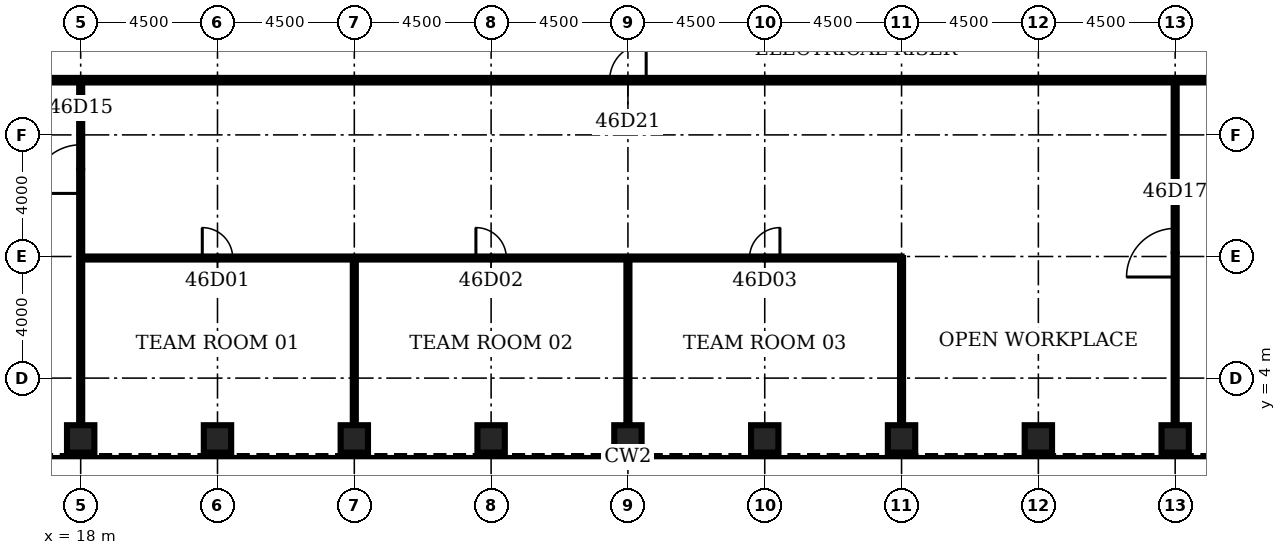
"""IFC4 building model, lengths in metres.
Left out: names, types, materials, properties, quantities, classifications, styles, units other than length and angle.
Written with IfcOpenShell. Run it as: python <this file> out.ifc"""

import sys

from ifc_helpers import new_model, si_unit, direction, frame, frame_2d, origin, origin_2d, place, context, subcontext, project, spatial, rectangle, hollow_rectangle, extrude, element, fill, save


model = new_model("IFC4")
c1 = context("Model", 3, precision=1e-05, world=origin(), true_north=direction((0.0, 1.0)))
c2 = subcontext(c1, "Body", "Model", "MODEL_VIEW")
j1 = project(units=[si_unit("LENGTHUNIT", "METRE"), si_unit("PLANEANGLEUNIT", "RADIAN")], contexts=[c1])
p1 = place(None, origin())
s1 = spatial("IfcSite", under=j1, at=p1, CompositionType="ELEMENT")
p2 = place(p1, origin())
s2 = spatial("IfcBuilding", under=s1, at=p2, CompositionType="ELEMENT")
p3 = place(p2, frame((0.0, 0.0, 206.8)))
s3 = spatial("IfcBuildingStorey", under=s2, at=p3, CompositionType="ELEMENT", Elevation=206.8)
for number, where, z_axis, x_axis in (
    (1, (18.0, 2.0, 0.0), (0.0, 0.0, 1.0), (0.0, 1.0, 0.0)),
    (2, (22.5, 2.0, 0.0), (0.0, 0.0, 1.0), (0.0, 1.0, 0.0)),
    (3, (27.0, 2.0, 0.0), (0.0, 0.0, 1.0), (0.0, 1.0, 0.0)),
    (4, (31.5, 2.0, 0.0), (0.0, 0.0, 1.0), (0.0, 1.0, 0.0)),
    (5, (36.0, 2.0, 0.0), (0.0, 0.0, 1.0), (0.0, 1.0, 0.0)),
    (6, (40.5, 2.0, 0.0), (0.0, 0.0, 1.0), (0.0, 1.0, 0.0)),
    (7, (45.0, 2.0, 0.0), (0.0, 0.0, 1.0), (0.0, 1.0, 0.0)),
    (8, (49.5, 2.0, 0.0), (0.0, 0.0, 1.0), (0.0, 1.0, 0.0)),
    (9, (54.0, 2.0, 0.0), (0.0, 0.0, 1.0), (0.0, 1.0, 0.0)),
):
    element("IfcColumn", number, at=place(p3, frame(where, z_axis=z_axis, x_axis=x_axis)), inside=s3, PredefinedType="COLUMN", context=c2, shape_type="SweptSolid", body=[
        extrude(hollow_rectangle(XDim=0.9, YDim=0.9, WallThickness=0.08, at=origin_2d()), origin(), (0.0, 0.0, 1.0), 4.2),
    ])
p4 = place(p3, frame((18.0, 7.95, 0.0), z_axis=(0.0, 0.0, 1.0), x_axis=(1.0, 0.0, 0.0)))
e10 = element("IfcWall", 10, at=p4, inside=s3, PredefinedType="PARTITIONING", context=c2, shape_type="SweptSolid", body=[
    extrude(rectangle(XDim=27.0, YDim=0.1, at=frame_2d((13.5, 0.0))), origin(), (0.0, 0.0, 1.0), 3.0),
])
p5 = place(p4, frame((4.0, 0.0, 0.0)))
e11 = element("IfcOpeningElement", 11, at=p5, cuts=e10, PredefinedType="OPENING", context=c2, shape_type="SweptSolid", body=[
    extrude(rectangle(XDim=1.0, YDim=2.1, at=frame_2d((0.5, 1.05))), frame((0.0, 0.06, 0.0), z_axis=(0.0, -1.0, 0.0), x_axis=(1.0, 0.0, 0.0)), (0.0, 0.0, 1.0), 0.12),
])
p6 = place(p4, frame((13.0, 0.0, 0.0)))
e12 = element("IfcOpeningElement", 12, at=p6, cuts=e10, PredefinedType="OPENING", context=c2, shape_type="SweptSolid", body=[
    extrude(rectangle(XDim=1.0, YDim=2.1, at=frame_2d((0.5, 1.05))), frame((0.0, 0.06, 0.0), z_axis=(0.0, -1.0, 0.0), x_axis=(1.0, 0.0, 0.0)), (0.0, 0.0, 1.0), 0.12),
])
p7 = place(p4, frame((22.0, 0.0, 0.0)))
e13 = element("IfcOpeningElement", 13, at=p7, cuts=e10, PredefinedType="OPENING", context=c2, shape_type="SweptSolid", body=[
    extrude(rectangle(XDim=1.0, YDim=2.1, at=frame_2d((0.5, 1.05))), frame((0.0, 0.06, 0.0), z_axis=(0.0, -1.0, 0.0), x_axis=(1.0, 0.0, 0.0)), (0.0, 0.0, 1.0), 0.12),
])
p8 = place(p3, frame((15.2, 13.8, 0.0), z_axis=(0.0, 0.0, 1.0), x_axis=(1.0, 0.0, 0.0)))
e14 = element("IfcWall", 14, at=p8, inside=s3, PredefinedType="PARTITIONING", context=c2, shape_type="SweptSolid", body=[
    extrude(rectangle(XDim=41.6, YDim=0.15, at=frame_2d((20.8, 0.0))), origin(), (0.0, 0.0, 1.0), 3.0),
])
p9 = place(p8, frame((20.2, 0.0, 0.0)))
e15 = element("IfcOpeningElement", 15, at=p9, cuts=e14, PredefinedType="OPENING", context=c2, shape_type="SweptSolid", body=[
    extrude(rectangle(XDim=1.2, YDim=2.1, at=frame_2d((0.6, 1.05))), frame((0.0, 0.085, 0.0), z_axis=(0.0, -1.0, 0.0), x_axis=(1.0, 0.0, 0.0)), (0.0, 0.0, 1.0), 0.17),
])
p10 = place(p3, frame((18.0, 2.45, 0.0), z_axis=(0.0, 0.0, 1.0), x_axis=(0.0, 1.0, 0.0)))
e16 = element("IfcWall", 16, at=p10, inside=s3, PredefinedType="PARTITIONING", context=c2, shape_type="SweptSolid", body=[
    extrude(rectangle(XDim=11.35, YDim=0.1, at=frame_2d((5.675, 0.0))), origin(), (0.0, 0.0, 1.0), 3.0),
])
p11 = place(p10, frame((7.625, 0.0, 0.0)))
e17 = element("IfcOpeningElement", 17, at=p11, cuts=e16, PredefinedType="OPENING", context=c2, shape_type="SweptSolid", body=[
    extrude(rectangle(XDim=1.6, YDim=2.1, at=frame_2d((0.8, 1.05))), frame((0.0, 0.06, 0.0), z_axis=(0.0, -1.0, 0.0), x_axis=(1.0, 0.0, 0.0)), (0.0, 0.0, 1.0), 0.12),
])
for number, where, z_axis, x_axis in (
    (18, (27.0, 2.45, 0.0), (0.0, 0.0, 1.0), (0.0, 1.0, 0.0)),
    (19, (36.0, 2.45, 0.0), (0.0, 0.0, 1.0), (0.0, 1.0, 0.0)),
    (20, (45.0, 2.45, 0.0), (0.0, 0.0, 1.0), (0.0, 1.0, 0.0)),
):
    element("IfcWall", number, at=place(p3, frame(where, z_axis=z_axis, x_axis=x_axis)), inside=s3, PredefinedType="PARTITIONING", context=c2, shape_type="SweptSolid", body=[
        extrude(rectangle(XDim=5.5, YDim=0.1, at=frame_2d((2.75, 0.0))), origin(), (0.0, 0.0, 1.0), 3.0),
    ])
p12 = place(p3, frame((54.0, 2.45, 0.0), z_axis=(0.0, 0.0, 1.0), x_axis=(0.0, 1.0, 0.0)))
e21 = element("IfcWall", 21, at=p12, inside=s3, PredefinedType="PARTITIONING", context=c2, shape_type="SweptSolid", body=[
    extrude(rectangle(XDim=11.35, YDim=0.1, at=frame_2d((5.675, 0.0))), origin(), (0.0, 0.0, 1.0), 3.0),
])
p13 = place(p12, frame((4.875, 0.0, 0.0)))
e22 = element("IfcOpeningElement", 22, at=p13, cuts=e21, PredefinedType="OPENING", context=c2, shape_type="SweptSolid", body=[
    extrude(rectangle(XDim=1.6, YDim=2.1, at=frame_2d((0.8, 1.05))), frame((0.0, 0.06, 0.0), z_axis=(0.0, -1.0, 0.0), x_axis=(1.0, 0.0, 0.0)), (0.0, 0.0, 1.0), 0.12),
])
p14 = place(p5, origin())
e23 = element("IfcDoor", 23, at=p14, inside=s3, OperationType="SINGLE_SWING_LEFT", PredefinedType="DOOR", context=c2, shape_type="SweptSolid", body=[
    extrude(rectangle(XDim=1.0, YDim=2.1, at=frame_2d((0.5, 1.05))), frame((0.0, 0.025, 0.0), z_axis=(0.0, -1.0, 0.0), x_axis=(1.0, 0.0, 0.0)), (0.0, 0.0, 1.0), 0.05),
])
fill(e11, e23)
p15 = place(p6, origin())
e24 = element("IfcDoor", 24, at=p15, inside=s3, OperationType="SINGLE_SWING_LEFT", PredefinedType="DOOR", context=c2, shape_type="SweptSolid", body=[
    extrude(rectangle(XDim=1.0, YDim=2.1, at=frame_2d((0.5, 1.05))), frame((0.0, 0.025, 0.0), z_axis=(0.0, -1.0, 0.0), x_axis=(1.0, 0.0, 0.0)), (0.0, 0.0, 1.0), 0.05),
])
fill(e12, e24)
p16 = place(p7, origin())
e25 = element("IfcDoor", 25, at=p16, inside=s3, OperationType="SINGLE_SWING_RIGHT", PredefinedType="DOOR", context=c2, shape_type="SweptSolid", body=[
    extrude(rectangle(XDim=1.0, YDim=2.1, at=frame_2d((0.5, 1.05))), frame((0.0, 0.025, 0.0), z_axis=(0.0, -1.0, 0.0), x_axis=(1.0, 0.0, 0.0)), (0.0, 0.0, 1.0), 0.05),
])
fill(e13, e25)
p17 = place(p11, origin())
e26 = element("IfcDoor", 26, at=p17, inside=s3, OperationType="SINGLE_SWING_LEFT", PredefinedType="DOOR", context=c2, shape_type="SweptSolid", body=[
    extrude(rectangle(XDim=1.6, YDim=2.1, at=frame_2d((0.8, 1.05))), frame((0.0, 0.025, 0.0), z_axis=(0.0, -1.0, 0.0), x_axis=(1.0, 0.0, 0.0)), (0.0, 0.0, 1.0), 0.05),
])
fill(e17, e26)
p18 = place(p13, origin())
e27 = element("IfcDoor", 27, at=p18, inside=s3, OperationType="SINGLE_SWING_LEFT", PredefinedType="DOOR", context=c2, shape_type="SweptSolid", body=[
    extrude(rectangle(XDim=1.6, YDim=2.1, at=frame_2d((0.8, 1.05))), frame((0.0, 0.025, 0.0), z_axis=(0.0, -1.0, 0.0), x_axis=(1.0, 0.0, 0.0)), (0.0, 0.0, 1.0), 0.05),
])
fill(e22, e27)
p19 = place(p9, origin())
e28 = element("IfcDoor", 28, at=p19, inside=s3, OperationType="SINGLE_SWING_RIGHT", PredefinedType="DOOR", context=c2, shape_type="SweptSolid", body=[
    extrude(rectangle(XDim=1.2, YDim=2.1, at=frame_2d((0.6, 1.05))), frame((0.0, 0.025, 0.0), z_axis=(0.0, -1.0, 0.0), x_axis=(1.0, 0.0, 0.0)), (0.0, 0.0, 1.0), 0.05),
])
fill(e15, e28)
save(model, sys.argv[1])
